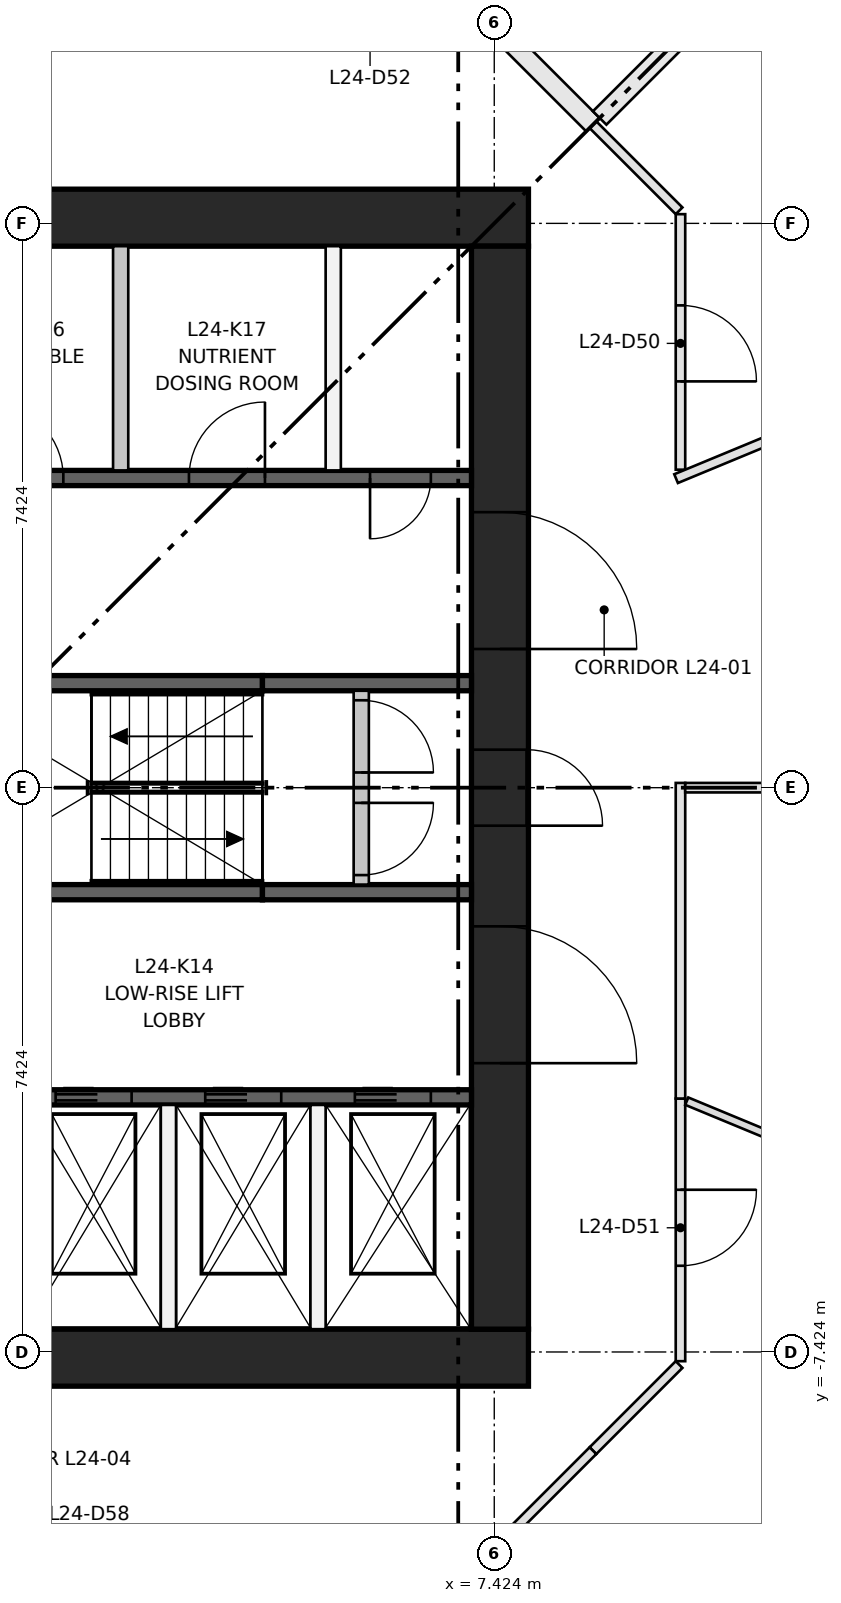
"""IFC4 building model, lengths in metres.
Left out: names, types, materials, properties, quantities, classifications, styles, units other than length and angle.
Written with IfcOpenShell. Run it as: python <this file> out.ifc"""

import sys

from ifc_helpers import new_model, si_unit, direction, frame, frame_2d, origin, place, context, subcontext, project, spatial, rectangle, extrude, element, fill, save


model = new_model("IFC4")
c1 = context("Model", 3, precision=1e-05, world=origin(), true_north=direction((0.0, 1.0)))
c2 = subcontext(c1, "Body", "Model", "MODEL_VIEW")
j1 = project(units=[si_unit("LENGTHUNIT", "METRE"), si_unit("PLANEANGLEUNIT", "RADIAN")], contexts=[c1])
p1 = place(None, origin())
s1 = spatial("IfcSite", under=j1, at=p1, CompositionType="ELEMENT")
p2 = place(p1, origin())
s2 = spatial("IfcBuilding", under=s1, at=p2, CompositionType="ELEMENT")
p3 = place(p2, frame((0.0, 0.0, 94.65)))
s3 = spatial("IfcBuildingStorey", under=s2, at=p3, CompositionType="ELEMENT", Elevation=94.65)
for number, where, z_axis, x_axis in (
    (1, (-7.874, -7.499, 0.0), (0.0, 0.0, 1.0), (1.0, 0.0, 0.0)),
    (2, (-7.874, 7.499, 0.0), (0.0, 0.0, 1.0), (1.0, 0.0, 0.0)),
):
    element("IfcWall", number, at=place(p3, frame(where, z_axis=z_axis, x_axis=x_axis)), inside=s3, PredefinedType="SHEAR", context=c2, shape_type="SweptSolid", body=[
        extrude(rectangle(XDim=15.748, YDim=0.75, at=frame_2d((7.874, 0.0))), origin(), (0.0, 0.0, 1.0), 3.65),
    ])
p4 = place(p3, frame((7.499, -7.124, 0.0), z_axis=(0.0, 0.0, 1.0), x_axis=(0.0, 1.0, 0.0)))
e3 = element("IfcWall", 3, at=p4, inside=s3, PredefinedType="SHEAR", context=c2, shape_type="SweptSolid", body=[
    extrude(rectangle(XDim=14.248, YDim=0.75, at=frame_2d((7.124, 0.0))), origin(), (0.0, 0.0, 1.0), 3.65),
])
p5 = place(p4, frame((6.624, 0.0, 0.0)))
e4 = element("IfcOpeningElement", 4, at=p5, cuts=e3, PredefinedType="OPENING", context=c2, shape_type="SweptSolid", body=[
    extrude(rectangle(XDim=1.0, YDim=2.1, at=frame_2d((0.5, 1.05))), frame((0.0, 0.385, 0.0), z_axis=(0.0, -1.0, 0.0), x_axis=(1.0, 0.0, 0.0)), (0.0, 0.0, 1.0), 0.77),
])
p6 = place(p4, frame((3.5, 0.0, 0.0)))
e5 = element("IfcOpeningElement", 5, at=p6, cuts=e3, PredefinedType="OPENING", context=c2, shape_type="SweptSolid", body=[
    extrude(rectangle(XDim=1.8, YDim=2.1, at=frame_2d((0.9, 1.05))), frame((0.0, 0.385, 0.0), z_axis=(0.0, -1.0, 0.0), x_axis=(1.0, 0.0, 0.0)), (0.0, 0.0, 1.0), 0.77),
])
p7 = place(p4, frame((8.948, 0.0, 0.0)))
e6 = element("IfcOpeningElement", 6, at=p7, cuts=e3, PredefinedType="OPENING", context=c2, shape_type="SweptSolid", body=[
    extrude(rectangle(XDim=1.8, YDim=2.1, at=frame_2d((0.9, 1.05))), frame((0.0, 0.385, 0.0), z_axis=(0.0, -1.0, 0.0), x_axis=(1.0, 0.0, 0.0)), (0.0, 0.0, 1.0), 0.77),
])
p8 = place(p3, frame((-7.124, -4.074, 0.0), z_axis=(0.0, 0.0, 1.0), x_axis=(1.0, 0.0, 0.0)))
e7 = element("IfcWall", 7, at=p8, inside=s3, PredefinedType="SHEAR", context=c2, shape_type="SweptSolid", body=[
    extrude(rectangle(XDim=14.248, YDim=0.2, at=frame_2d((7.124, 0.0))), origin(), (0.0, 0.0, 1.0), 3.3),
])
p9 = place(p8, frame((1.069, 0.0, 0.0)))
e8 = element("IfcOpeningElement", 8, at=p9, cuts=e7, PredefinedType="OPENING", context=c2, shape_type="SweptSolid", body=[
    extrude(rectangle(XDim=1.1, YDim=2.1, at=frame_2d((0.55, 1.05))), frame((0.0, 0.11, 0.0), z_axis=(0.0, -1.0, 0.0), x_axis=(1.0, 0.0, 0.0)), (0.0, 0.0, 1.0), 0.22),
])
p10 = place(p8, frame((4.206, 0.0, 0.0)))
e9 = element("IfcOpeningElement", 9, at=p10, cuts=e7, PredefinedType="OPENING", context=c2, shape_type="SweptSolid", body=[
    extrude(rectangle(XDim=1.1, YDim=2.1, at=frame_2d((0.55, 1.05))), frame((0.0, 0.11, 0.0), z_axis=(0.0, -1.0, 0.0), x_axis=(1.0, 0.0, 0.0)), (0.0, 0.0, 1.0), 0.22),
])
p11 = place(p8, frame((6.808, 0.0, 0.0)))
e10 = element("IfcOpeningElement", 10, at=p11, cuts=e7, PredefinedType="OPENING", context=c2, shape_type="SweptSolid", body=[
    extrude(rectangle(XDim=1.0, YDim=2.1, at=frame_2d((0.5, 1.05))), frame((0.0, 0.11, 0.0), z_axis=(0.0, -1.0, 0.0), x_axis=(1.0, 0.0, 0.0)), (0.0, 0.0, 1.0), 0.22),
])
p12 = place(p8, frame((8.777, 0.0, 0.0)))
e11 = element("IfcOpeningElement", 11, at=p12, cuts=e7, PredefinedType="OPENING", context=c2, shape_type="SweptSolid", body=[
    extrude(rectangle(XDim=1.0, YDim=2.1, at=frame_2d((0.5, 1.05))), frame((0.0, 0.11, 0.0), z_axis=(0.0, -1.0, 0.0), x_axis=(1.0, 0.0, 0.0)), (0.0, 0.0, 1.0), 0.22),
])
p13 = place(p8, frame((10.745, 0.0, 0.0)))
e12 = element("IfcOpeningElement", 12, at=p13, cuts=e7, PredefinedType="OPENING", context=c2, shape_type="SweptSolid", body=[
    extrude(rectangle(XDim=1.0, YDim=2.1, at=frame_2d((0.5, 1.05))), frame((0.0, 0.11, 0.0), z_axis=(0.0, -1.0, 0.0), x_axis=(1.0, 0.0, 0.0)), (0.0, 0.0, 1.0), 0.22),
])
p14 = place(p8, frame((12.714, 0.0, 0.0)))
e13 = element("IfcOpeningElement", 13, at=p14, cuts=e7, PredefinedType="OPENING", context=c2, shape_type="SweptSolid", body=[
    extrude(rectangle(XDim=1.0, YDim=2.1, at=frame_2d((0.5, 1.05))), frame((0.0, 0.11, 0.0), z_axis=(0.0, -1.0, 0.0), x_axis=(1.0, 0.0, 0.0)), (0.0, 0.0, 1.0), 0.22),
])
p15 = place(p3, frame((0.0, 4.074, 0.0), z_axis=(0.0, 0.0, 1.0), x_axis=(1.0, 0.0, 0.0)))
e14 = element("IfcWall", 14, at=p15, inside=s3, PredefinedType="SHEAR", context=c2, shape_type="SweptSolid", body=[
    extrude(rectangle(XDim=7.124, YDim=0.2, at=frame_2d((3.562, 0.0))), origin(), (0.0, 0.0, 1.0), 3.3),
])
p16 = place(p15, frame((0.754, 0.0, 0.0)))
e15 = element("IfcOpeningElement", 15, at=p16, cuts=e14, PredefinedType="OPENING", context=c2, shape_type="SweptSolid", body=[
    extrude(rectangle(XDim=1.0, YDim=2.1, at=frame_2d((0.5, 1.05))), frame((0.0, 0.11, 0.0), z_axis=(0.0, -1.0, 0.0), x_axis=(1.0, 0.0, 0.0)), (0.0, 0.0, 1.0), 0.22),
])
p17 = place(p15, frame((3.407, 0.0, 0.0)))
e16 = element("IfcOpeningElement", 16, at=p17, cuts=e14, PredefinedType="OPENING", context=c2, shape_type="SweptSolid", body=[
    extrude(rectangle(XDim=1.0, YDim=2.1, at=frame_2d((0.5, 1.05))), frame((0.0, 0.11, 0.0), z_axis=(0.0, -1.0, 0.0), x_axis=(1.0, 0.0, 0.0)), (0.0, 0.0, 1.0), 0.22),
])
p18 = place(p15, frame((5.79, 0.0, 0.0)))
e17 = element("IfcOpeningElement", 17, at=p18, cuts=e14, PredefinedType="OPENING", context=c2, shape_type="SweptSolid", body=[
    extrude(rectangle(XDim=0.8, YDim=2.1, at=frame_2d((0.4, 1.05))), frame((0.0, 0.11, 0.0), z_axis=(0.0, -1.0, 0.0), x_axis=(1.0, 0.0, 0.0)), (0.0, 0.0, 1.0), 0.22),
])
p19 = place(p3, frame((0.0, -1.375, 0.0), z_axis=(0.0, 0.0, 1.0), x_axis=(1.0, 0.0, 0.0)))
e18 = element("IfcWall", 18, at=p19, inside=s3, PredefinedType="SHEAR", context=c2, shape_type="SweptSolid", body=[
    extrude(rectangle(XDim=4.374, YDim=0.2, at=frame_2d((2.187, 0.0))), origin(), (0.0, 0.0, 1.0), 3.3),
])
p20 = place(p3, frame((4.374, -1.375, 0.0), z_axis=(0.0, 0.0, 1.0), x_axis=(1.0, 0.0, 0.0)))
e19 = element("IfcWall", 19, at=p20, inside=s3, PredefinedType="SHEAR", context=c2, shape_type="SweptSolid", body=[
    extrude(rectangle(XDim=2.75, YDim=0.2, at=frame_2d((1.375, 0.0))), origin(), (0.0, 0.0, 1.0), 3.3),
])
p21 = place(p3, frame((0.0, 1.375, 0.0), z_axis=(0.0, 0.0, 1.0), x_axis=(1.0, 0.0, 0.0)))
e20 = element("IfcWall", 20, at=p21, inside=s3, PredefinedType="SHEAR", context=c2, shape_type="SweptSolid", body=[
    extrude(rectangle(XDim=4.374, YDim=0.2, at=frame_2d((2.187, 0.0))), origin(), (0.0, 0.0, 1.0), 3.3),
])
p22 = place(p3, frame((4.374, 1.375, 0.0), z_axis=(0.0, 0.0, 1.0), x_axis=(1.0, 0.0, 0.0)))
e21 = element("IfcWall", 21, at=p22, inside=s3, PredefinedType="SHEAR", context=c2, shape_type="SweptSolid", body=[
    extrude(rectangle(XDim=2.75, YDim=0.2, at=frame_2d((1.375, 0.0))), origin(), (0.0, 0.0, 1.0), 3.3),
])
for number, where, z_axis, x_axis in (
    (22, (3.137, -7.124, 0.0), (0.0, 0.0, 1.0), (0.0, 1.0, 0.0)),
    (23, (5.105, -7.124, 0.0), (0.0, 0.0, 1.0), (0.0, 1.0, 0.0)),
    (24, (2.509, 4.174, 0.0), (0.0, 0.0, 1.0), (0.0, 1.0, 0.0)),
    (25, (5.305, 4.174, 0.0), (0.0, 0.0, 1.0), (0.0, 1.0, 0.0)),
):
    element("IfcWall", number, at=place(p3, frame(where, z_axis=z_axis, x_axis=x_axis)), inside=s3, PredefinedType="PARTITIONING", context=c2, shape_type="SweptSolid", body=[
        extrude(rectangle(XDim=2.95, YDim=0.2, at=frame_2d((1.475, 0.0))), origin(), (0.0, 0.0, 1.0), 3.3),
    ])
p23 = place(p3, frame((5.674, -1.275, 0.0), z_axis=(0.0, 0.0, 1.0), x_axis=(0.0, 1.0, 0.0)))
e26 = element("IfcWall", 26, at=p23, inside=s3, PredefinedType="PARTITIONING", context=c2, shape_type="SweptSolid", body=[
    extrude(rectangle(XDim=2.55, YDim=0.2, at=frame_2d((1.275, 0.0))), origin(), (0.0, 0.0, 1.0), 3.3),
])
p24 = place(p23, frame((0.125, 0.0, 0.0)))
e27 = element("IfcOpeningElement", 27, at=p24, cuts=e26, PredefinedType="OPENING", context=c2, shape_type="SweptSolid", body=[
    extrude(rectangle(XDim=0.95, YDim=2.1, at=frame_2d((0.475, 1.05))), frame((0.0, 0.11, 0.0), z_axis=(0.0, -1.0, 0.0), x_axis=(1.0, 0.0, 0.0)), (0.0, 0.0, 1.0), 0.22),
])
p25 = place(p23, frame((1.475, 0.0, 0.0)))
e28 = element("IfcOpeningElement", 28, at=p25, cuts=e26, PredefinedType="OPENING", context=c2, shape_type="SweptSolid", body=[
    extrude(rectangle(XDim=0.95, YDim=2.1, at=frame_2d((0.475, 1.05))), frame((0.0, 0.11, 0.0), z_axis=(0.0, -1.0, 0.0), x_axis=(1.0, 0.0, 0.0)), (0.0, 0.0, 1.0), 0.22),
])
p26 = place(p3, frame((8.722, 8.722, 0.0), z_axis=(0.0, 0.0, 1.0), x_axis=(0.70718294931, -0.707030604857, 0.0)))
e29 = element("IfcWall", 29, at=p26, inside=s3, PredefinedType="PARTITIONING", context=c2, shape_type="SweptSolid", body=[
    extrude(rectangle(XDim=1.603, YDim=0.125, at=frame_2d((0.801, 0.0))), origin(), (0.0, 0.0, 1.0), 3.3),
])
p27 = place(p3, frame((9.874, 7.545, 0.0), z_axis=(0.0, 0.0, 1.0), x_axis=(0.0, -1.0, 0.0)))
e30 = element("IfcWall", 30, at=p27, inside=s3, PredefinedType="PARTITIONING", context=c2, shape_type="SweptSolid", body=[
    extrude(rectangle(XDim=3.362, YDim=0.125, at=frame_2d((1.681, 0.0))), origin(), (0.0, 0.0, 1.0), 3.3),
])
p28 = place(p27, frame((1.2, 0.0, 0.0)))
e31 = element("IfcOpeningElement", 31, at=p28, cuts=e30, PredefinedType="OPENING", context=c2, shape_type="SweptSolid", body=[
    extrude(rectangle(XDim=1.0, YDim=2.1, at=frame_2d((0.5, 1.05))), frame((0.0, 0.073, 0.0), z_axis=(0.0, -1.0, 0.0), x_axis=(1.0, 0.0, 0.0)), (0.0, 0.0, 1.0), 0.145),
])
p29 = place(p3, frame((9.856, -7.589, 0.0), z_axis=(0.0, 0.0, 1.0), x_axis=(-0.70718294931, -0.707030604857, 0.0)))
e32 = element("IfcWall", 32, at=p29, inside=s3, PredefinedType="PARTITIONING", context=c2, shape_type="SweptSolid", body=[
    extrude(rectangle(XDim=1.603, YDim=0.125, at=frame_2d((0.801, 0.0))), origin(), (0.0, 0.0, 1.0), 3.3),
])
p30 = place(p3, frame((9.874, -4.09, 0.0), z_axis=(0.0, 0.0, 1.0), x_axis=(0.0, -1.0, 0.0)))
e33 = element("IfcWall", 33, at=p30, inside=s3, PredefinedType="PARTITIONING", context=c2, shape_type="SweptSolid", body=[
    extrude(rectangle(XDim=3.455, YDim=0.125, at=frame_2d((1.728, 0.0))), origin(), (0.0, 0.0, 1.0), 3.3),
])
p31 = place(p30, frame((1.2, 0.0, 0.0)))
e34 = element("IfcOpeningElement", 34, at=p31, cuts=e33, PredefinedType="OPENING", context=c2, shape_type="SweptSolid", body=[
    extrude(rectangle(XDim=1.0, YDim=2.1, at=frame_2d((0.5, 1.05))), frame((0.0, 0.073, 0.0), z_axis=(0.0, -1.0, 0.0), x_axis=(1.0, 0.0, 0.0)), (0.0, 0.0, 1.0), 0.145),
])
p32 = place(p3, frame((9.874, 0.062, 0.0), z_axis=(0.0, 0.0, 1.0), x_axis=(0.0, -1.0, 0.0)))
e35 = element("IfcWall", 35, at=p32, inside=s3, PredefinedType="PARTITIONING", context=c2, shape_type="SweptSolid", body=[
    extrude(rectangle(XDim=4.152, YDim=0.125, at=frame_2d((2.076, 0.0))), origin(), (0.0, 0.0, 1.0), 3.3),
])
p33 = place(p3, frame((7.608, 9.837, 0.0), z_axis=(0.0, 0.0, 1.0), x_axis=(0.707029353672, -0.707184200224, 0.0)))
e36 = element("IfcWall", 36, at=p33, inside=s3, PredefinedType="PARTITIONING", context=c2, shape_type="SweptSolid", body=[
    extrude(rectangle(XDim=1.577, YDim=0.25, at=frame_2d((0.788, 0.0))), origin(), (0.0, 0.0, 1.0), 3.3),
])
p34 = place(p3, frame((8.722, -8.722, 0.0), z_axis=(0.0, 0.0, 1.0), x_axis=(-0.707030604857, -0.70718294931, 0.0)))
e37 = element("IfcWall", 37, at=p34, inside=s3, PredefinedType="PARTITIONING", context=c2, shape_type="SweptSolid", body=[
    extrude(rectangle(XDim=1.603, YDim=0.125, at=frame_2d((0.801, 0.0))), origin(), (0.0, 0.0, 1.0), 3.3),
])
p35 = place(p3, frame((9.816, 4.066, 0.0), z_axis=(0.0, 0.0, 1.0), x_axis=(0.923881608957, 0.382678419342, 0.0)))
e38 = element("IfcWall", 38, at=p35, inside=s3, PredefinedType="PARTITIONING", context=c2, shape_type="SweptSolid", body=[
    extrude(rectangle(XDim=3.895, YDim=0.125, at=frame_2d((1.947, 0.0))), origin(), (0.0, 0.0, 1.0), 3.3),
])
p36 = place(p3, frame((14.52, 0.0, 0.0), z_axis=(0.0, 0.0, 1.0), x_axis=(-1.0, 0.0, 0.0)))
e39 = element("IfcWall", 39, at=p36, inside=s3, PredefinedType="PARTITIONING", context=c2, shape_type="SweptSolid", body=[
    extrude(rectangle(XDim=4.583, YDim=0.125, at=frame_2d((2.292, 0.0))), origin(), (0.0, 0.0, 1.0), 3.3),
])
p37 = place(p36, frame((1.8, 0.0, 0.0)))
e40 = element("IfcOpeningElement", 40, at=p37, cuts=e39, PredefinedType="OPENING", context=c2, shape_type="SweptSolid", body=[
    extrude(rectangle(XDim=1.0, YDim=2.1, at=frame_2d((0.5, 1.05))), frame((0.0, 0.073, 0.0), z_axis=(0.0, -1.0, 0.0), x_axis=(1.0, 0.0, 0.0)), (0.0, 0.0, 1.0), 0.145),
])
p38 = place(p3, frame((12.792, 12.792, 0.0), z_axis=(0.0, 0.0, 1.0), x_axis=(-0.707106781187, -0.707106781187, 0.0)))
e41 = element("IfcWall", 41, at=p38, inside=s3, PredefinedType="PARTITIONING", context=c2, shape_type="SweptSolid", body=[
    extrude(rectangle(XDim=5.63, YDim=0.25, at=frame_2d((2.815, 0.0))), origin(), (0.0, 0.0, 1.0), 3.3),
])
p39 = place(p3, frame((9.957, -4.124, 0.0), z_axis=(0.0, 0.0, 1.0), x_axis=(0.923887259949, -0.382664776147, 0.0)))
e42 = element("IfcWall", 42, at=p39, inside=s3, PredefinedType="PARTITIONING", context=c2, shape_type="SweptSolid", body=[
    extrude(rectangle(XDim=3.743, YDim=0.105, at=frame_2d((1.872, 0.0))), origin(), (0.0, 0.0, 1.0), 3.3),
])
p40 = place(p12, origin())
e43 = element("IfcDoor", 43, at=p40, inside=s3, OperationType="DOUBLE_DOOR_SLIDING", PredefinedType="DOOR", context=c2, shape_type="SweptSolid", body=[
    extrude(rectangle(XDim=1.0, YDim=2.1, at=frame_2d((0.5, 1.05))), frame((0.0, 0.025, 0.0), z_axis=(0.0, -1.0, 0.0), x_axis=(1.0, 0.0, 0.0)), (0.0, 0.0, 1.0), 0.05),
])
fill(e11, e43)
p41 = place(p13, origin())
e44 = element("IfcDoor", 44, at=p41, inside=s3, OperationType="DOUBLE_DOOR_SLIDING", PredefinedType="DOOR", context=c2, shape_type="SweptSolid", body=[
    extrude(rectangle(XDim=1.0, YDim=2.1, at=frame_2d((0.5, 1.05))), frame((0.0, 0.025, 0.0), z_axis=(0.0, -1.0, 0.0), x_axis=(1.0, 0.0, 0.0)), (0.0, 0.0, 1.0), 0.05),
])
fill(e12, e44)
p42 = place(p14, origin())
e45 = element("IfcDoor", 45, at=p42, inside=s3, OperationType="DOUBLE_DOOR_SLIDING", PredefinedType="DOOR", context=c2, shape_type="SweptSolid", body=[
    extrude(rectangle(XDim=1.0, YDim=2.1, at=frame_2d((0.5, 1.05))), frame((0.0, 0.025, 0.0), z_axis=(0.0, -1.0, 0.0), x_axis=(1.0, 0.0, 0.0)), (0.0, 0.0, 1.0), 0.05),
])
fill(e13, e45)
p43 = place(p24, frame((0.95, 0.0, 0.0), z_axis=(0.0, 0.0, 1.0), x_axis=(-1.0, 0.0, 0.0)))
e46 = element("IfcDoor", 46, at=p43, inside=s3, OperationType="SINGLE_SWING_RIGHT", PredefinedType="DOOR", context=c2, shape_type="SweptSolid", body=[
    extrude(rectangle(XDim=0.95, YDim=2.1, at=frame_2d((0.475, 1.05))), frame((0.0, 0.025, 0.0), z_axis=(0.0, -1.0, 0.0), x_axis=(1.0, 0.0, 0.0)), (0.0, 0.0, 1.0), 0.05),
])
fill(e27, e46)
p44 = place(p25, frame((0.95, 0.0, 0.0), z_axis=(0.0, 0.0, 1.0), x_axis=(-1.0, 0.0, 0.0)))
e47 = element("IfcDoor", 47, at=p44, inside=s3, OperationType="SINGLE_SWING_LEFT", PredefinedType="DOOR", context=c2, shape_type="SweptSolid", body=[
    extrude(rectangle(XDim=0.95, YDim=2.1, at=frame_2d((0.475, 1.05))), frame((0.0, 0.025, 0.0), z_axis=(0.0, -1.0, 0.0), x_axis=(1.0, 0.0, 0.0)), (0.0, 0.0, 1.0), 0.05),
])
fill(e28, e47)
p45 = place(p16, origin())
e48 = element("IfcDoor", 48, at=p45, inside=s3, OperationType="SINGLE_SWING_LEFT", PredefinedType="DOOR", context=c2, shape_type="SweptSolid", body=[
    extrude(rectangle(XDim=1.0, YDim=2.1, at=frame_2d((0.5, 1.05))), frame((0.0, 0.025, 0.0), z_axis=(0.0, -1.0, 0.0), x_axis=(1.0, 0.0, 0.0)), (0.0, 0.0, 1.0), 0.05),
])
fill(e15, e48)
p46 = place(p17, origin())
e49 = element("IfcDoor", 49, at=p46, inside=s3, OperationType="SINGLE_SWING_RIGHT", PredefinedType="DOOR", context=c2, shape_type="SweptSolid", body=[
    extrude(rectangle(XDim=1.0, YDim=2.1, at=frame_2d((0.5, 1.05))), frame((0.0, 0.025, 0.0), z_axis=(0.0, -1.0, 0.0), x_axis=(1.0, 0.0, 0.0)), (0.0, 0.0, 1.0), 0.05),
])
fill(e16, e49)
p47 = place(p18, frame((0.8, 0.0, 0.0), z_axis=(0.0, 0.0, 1.0), x_axis=(-1.0, 0.0, 0.0)))
e50 = element("IfcDoor", 50, at=p47, inside=s3, OperationType="SINGLE_SWING_LEFT", PredefinedType="DOOR", context=c2, shape_type="SweptSolid", body=[
    extrude(rectangle(XDim=0.8, YDim=2.1, at=frame_2d((0.4, 1.05))), frame((0.0, 0.025, 0.0), z_axis=(0.0, -1.0, 0.0), x_axis=(1.0, 0.0, 0.0)), (0.0, 0.0, 1.0), 0.05),
])
fill(e17, e50)
p48 = place(p5, frame((1.0, 0.0, 0.0), z_axis=(0.0, 0.0, 1.0), x_axis=(-1.0, 0.0, 0.0)))
e51 = element("IfcDoor", 51, at=p48, inside=s3, OperationType="SINGLE_SWING_LEFT", PredefinedType="DOOR", context=c2, shape_type="SweptSolid", body=[
    extrude(rectangle(XDim=1.0, YDim=2.1, at=frame_2d((0.5, 1.05))), frame((0.0, 0.375, 0.0), z_axis=(0.0, -1.0, 0.0), x_axis=(1.0, 0.0, 0.0)), (0.0, 0.0, 1.0), 0.05),
])
fill(e4, e51)
p49 = place(p6, frame((1.8, 0.0, 0.0), z_axis=(0.0, 0.0, 1.0), x_axis=(-1.0, 0.0, 0.0)))
e52 = element("IfcDoor", 52, at=p49, inside=s3, OperationType="DOUBLE_DOOR_SINGLE_SWING", PredefinedType="DOOR", context=c2, shape_type="SweptSolid", body=[
    extrude(rectangle(XDim=1.8, YDim=2.1, at=frame_2d((0.9, 1.05))), frame((0.0, 0.025, 0.0), z_axis=(0.0, -1.0, 0.0), x_axis=(1.0, 0.0, 0.0)), (0.0, 0.0, 1.0), 0.05),
])
fill(e5, e52)
p50 = place(p7, frame((1.8, 0.0, 0.0), z_axis=(0.0, 0.0, 1.0), x_axis=(-1.0, 0.0, 0.0)))
e53 = element("IfcDoor", 53, at=p50, inside=s3, OperationType="DOUBLE_DOOR_SINGLE_SWING", PredefinedType="DOOR", context=c2, shape_type="SweptSolid", body=[
    extrude(rectangle(XDim=1.8, YDim=2.1, at=frame_2d((0.9, 1.05))), frame((0.0, 0.025, 0.0), z_axis=(0.0, -1.0, 0.0), x_axis=(1.0, 0.0, 0.0)), (0.0, 0.0, 1.0), 0.05),
])
fill(e6, e53)
p51 = place(p28, origin())
e54 = element("IfcDoor", 54, at=p51, inside=s3, OperationType="SINGLE_SWING_RIGHT", PredefinedType="DOOR", context=c2, shape_type="SweptSolid", body=[
    extrude(rectangle(XDim=1.0, YDim=2.1, at=frame_2d((0.5, 1.05))), frame((0.0, 0.025, 0.0), z_axis=(0.0, -1.0, 0.0), x_axis=(1.0, 0.0, 0.0)), (0.0, 0.0, 1.0), 0.05),
])
fill(e31, e54)
p52 = place(p31, origin())
e55 = element("IfcDoor", 55, at=p52, inside=s3, OperationType="SINGLE_SWING_LEFT", PredefinedType="DOOR", context=c2, shape_type="SweptSolid", body=[
    extrude(rectangle(XDim=1.0, YDim=2.1, at=frame_2d((0.5, 1.05))), frame((0.0, 0.025, 0.0), z_axis=(0.0, -1.0, 0.0), x_axis=(1.0, 0.0, 0.0)), (0.0, 0.0, 1.0), 0.05),
])
fill(e34, e55)
save(model, sys.argv[1])
